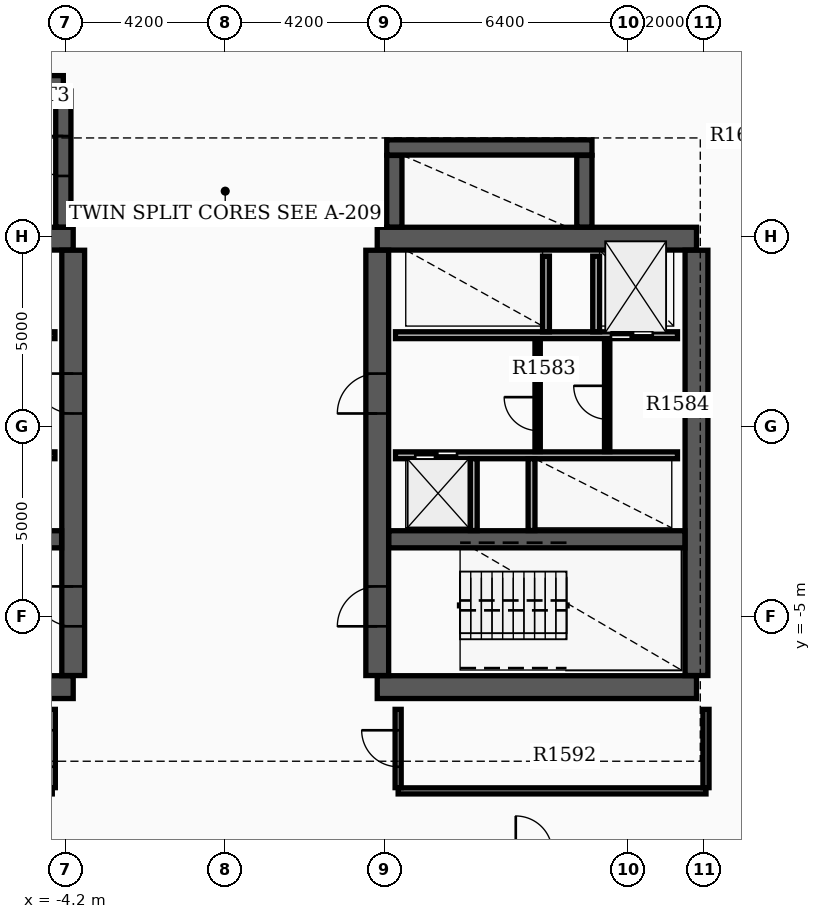
"""IFC4 building model, lengths in metres.
Left out: names, types, materials, properties, quantities, classifications, styles, units other than length and angle.
Written with IfcOpenShell. Run it as: python <this file> out.ifc"""

import sys

from ifc_helpers import new_model, si_unit, direction, frame, frame_2d, origin, place, context, subcontext, project, spatial, rectangle, extrude, element, fill, save


model = new_model("IFC4")
c1 = context("Model", 3, precision=1e-05, world=origin(), true_north=direction((0.0, 1.0)))
c2 = subcontext(c1, "Body", "Model", "MODEL_VIEW")
j1 = project(units=[si_unit("LENGTHUNIT", "METRE"), si_unit("PLANEANGLEUNIT", "RADIAN")], contexts=[c1])
p1 = place(None, origin())
s1 = spatial("IfcSite", under=j1, at=p1, CompositionType="ELEMENT")
p2 = place(p1, origin())
s2 = spatial("IfcBuilding", under=s1, at=p2, CompositionType="ELEMENT")
p3 = place(p2, frame((0.0, 0.0, 104.7)))
s3 = spatial("IfcBuildingStorey", under=s2, at=p3, CompositionType="ELEMENT", Elevation=104.7)
for number, where, z_axis, x_axis in (
    (1, (-12.4, -6.85, 0.0), (0.0, 0.0, 1.0), (1.0, 0.0, 0.0)),
    (2, (-12.4, 4.95, 0.0), (0.0, 0.0, 1.0), (1.0, 0.0, 0.0)),
):
    element("IfcWall", number, at=place(p3, frame(where, z_axis=z_axis, x_axis=x_axis)), inside=s3, PredefinedType="SHEAR", context=c2, shape_type="SweptSolid", body=[
        extrude(rectangle(XDim=8.4, YDim=0.6, at=frame_2d((4.2, 0.0))), origin(), (0.0, 0.0, 1.0), 3.7),
    ])
p4 = place(p3, frame((-4.0, -6.545, 0.0), z_axis=(0.0, 0.0, 1.0), x_axis=(0.0, 1.0, 0.0)))
e3 = element("IfcWall", 3, at=p4, inside=s3, PredefinedType="SHEAR", context=c2, shape_type="SweptSolid", body=[
    extrude(rectangle(XDim=11.19, YDim=0.6, at=frame_2d((5.595, 0.0))), origin(), (0.0, 0.0, 1.0), 3.7),
])
p5 = place(p4, frame((1.295, 0.0, 0.0)))
e4 = element("IfcOpeningElement", 4, at=p5, cuts=e3, PredefinedType="OPENING", context=c2, shape_type="SweptSolid", body=[
    extrude(rectangle(XDim=1.05, YDim=2.15, at=frame_2d((0.525, 1.075))), frame((0.0, 0.31, 0.0), z_axis=(0.0, -1.0, 0.0), x_axis=(1.0, 0.0, 0.0)), (0.0, 0.0, 1.0), 0.62),
])
p6 = place(p4, frame((6.895, 0.0, 0.0)))
e5 = element("IfcOpeningElement", 5, at=p6, cuts=e3, PredefinedType="OPENING", context=c2, shape_type="SweptSolid", body=[
    extrude(rectangle(XDim=1.05, YDim=2.15, at=frame_2d((0.525, 1.075))), frame((0.0, 0.31, 0.0), z_axis=(0.0, -1.0, 0.0), x_axis=(1.0, 0.0, 0.0)), (0.0, 0.0, 1.0), 0.62),
])
p7 = place(p3, frame((-12.095, -2.96, 0.0), z_axis=(0.0, 0.0, 1.0), x_axis=(1.0, 0.0, 0.0)))
e6 = element("IfcWall", 6, at=p7, inside=s3, PredefinedType="SHEAR", context=c2, shape_type="SweptSolid", body=[
    extrude(rectangle(XDim=7.79, YDim=0.45, at=frame_2d((3.895, 0.0))), origin(), (0.0, 0.0, 1.0), 3.7),
])
for number, where, z_axis, x_axis in (
    (7, (4.0, -6.85, 0.0), (0.0, 0.0, 1.0), (1.0, 0.0, 0.0)),
    (8, (4.0, 4.95, 0.0), (0.0, 0.0, 1.0), (1.0, 0.0, 0.0)),
):
    element("IfcWall", number, at=place(p3, frame(where, z_axis=z_axis, x_axis=x_axis)), inside=s3, PredefinedType="SHEAR", context=c2, shape_type="SweptSolid", body=[
        extrude(rectangle(XDim=8.4, YDim=0.6, at=frame_2d((4.2, 0.0))), origin(), (0.0, 0.0, 1.0), 3.7),
    ])
p8 = place(p3, frame((4.0, -6.545, 0.0), z_axis=(0.0, 0.0, 1.0), x_axis=(0.0, 1.0, 0.0)))
e9 = element("IfcWall", 9, at=p8, inside=s3, PredefinedType="SHEAR", context=c2, shape_type="SweptSolid", body=[
    extrude(rectangle(XDim=11.19, YDim=0.6, at=frame_2d((5.595, 0.0))), origin(), (0.0, 0.0, 1.0), 3.7),
])
p9 = place(p8, frame((1.295, 0.0, 0.0)))
e10 = element("IfcOpeningElement", 10, at=p9, cuts=e9, PredefinedType="OPENING", context=c2, shape_type="SweptSolid", body=[
    extrude(rectangle(XDim=1.05, YDim=2.15, at=frame_2d((0.525, 1.075))), frame((0.0, 0.31, 0.0), z_axis=(0.0, -1.0, 0.0), x_axis=(1.0, 0.0, 0.0)), (0.0, 0.0, 1.0), 0.62),
])
p10 = place(p8, frame((6.895, 0.0, 0.0)))
e11 = element("IfcOpeningElement", 11, at=p10, cuts=e9, PredefinedType="OPENING", context=c2, shape_type="SweptSolid", body=[
    extrude(rectangle(XDim=1.05, YDim=2.15, at=frame_2d((0.525, 1.075))), frame((0.0, 0.31, 0.0), z_axis=(0.0, -1.0, 0.0), x_axis=(1.0, 0.0, 0.0)), (0.0, 0.0, 1.0), 0.62),
])
p11 = place(p3, frame((12.4, -6.545, 0.0), z_axis=(0.0, 0.0, 1.0), x_axis=(0.0, 1.0, 0.0)))
e12 = element("IfcWall", 12, at=p11, inside=s3, PredefinedType="SHEAR", context=c2, shape_type="SweptSolid", body=[
    extrude(rectangle(XDim=11.19, YDim=0.6, at=frame_2d((5.595, 0.0))), origin(), (0.0, 0.0, 1.0), 3.7),
])
p12 = place(p3, frame((4.305, -2.96, 0.0), z_axis=(0.0, 0.0, 1.0), x_axis=(1.0, 0.0, 0.0)))
e13 = element("IfcWall", 13, at=p12, inside=s3, PredefinedType="SHEAR", context=c2, shape_type="SweptSolid", body=[
    extrude(rectangle(XDim=7.79, YDim=0.45, at=frame_2d((3.895, 0.0))), origin(), (0.0, 0.0, 1.0), 3.7),
])
p13 = place(p3, frame((-12.22, 9.04, 0.0), z_axis=(0.0, 0.0, 1.0), x_axis=(1.0, 0.0, 0.0)))
e14 = element("IfcWall", 14, at=p13, inside=s3, PredefinedType="SHEAR", context=c2, shape_type="SweptSolid", body=[
    extrude(rectangle(XDim=7.96, YDim=0.4, at=frame_2d((3.98, 0.0))), origin(), (0.0, 0.0, 1.0), 3.7),
])
p14 = place(p3, frame((-4.26, 5.255, 0.0), z_axis=(0.0, 0.0, 1.0), x_axis=(0.0, 1.0, 0.0)))
e15 = element("IfcWall", 15, at=p14, inside=s3, PredefinedType="SHEAR", context=c2, shape_type="SweptSolid", body=[
    extrude(rectangle(XDim=3.58, YDim=0.4, at=frame_2d((1.79, 0.0))), origin(), (0.0, 0.0, 1.0), 3.7),
])
p15 = place(p14, frame((1.345, 0.0, 0.0)))
e16 = element("IfcOpeningElement", 16, at=p15, cuts=e15, PredefinedType="OPENING", context=c2, shape_type="SweptSolid", body=[
    extrude(rectangle(XDim=1.05, YDim=2.15, at=frame_2d((0.525, 1.075))), frame((0.0, 0.21, 0.0), z_axis=(0.0, -1.0, 0.0), x_axis=(1.0, 0.0, 0.0)), (0.0, 0.0, 1.0), 0.42),
])
p16 = place(p3, frame((4.45, 5.255, 0.0), z_axis=(0.0, 0.0, 1.0), x_axis=(0.0, 1.0, 0.0)))
e17 = element("IfcWall", 17, at=p16, inside=s3, PredefinedType="SHEAR", context=c2, shape_type="SweptSolid", body=[
    extrude(rectangle(XDim=1.885, YDim=0.4, at=frame_2d((0.942, 0.0))), origin(), (0.0, 0.0, 1.0), 3.7),
])
p17 = place(p3, frame((4.25, 7.35, 0.0), z_axis=(0.0, 0.0, 1.0), x_axis=(1.0, 0.0, 0.0)))
e18 = element("IfcWall", 18, at=p17, inside=s3, PredefinedType="SHEAR", context=c2, shape_type="SweptSolid", body=[
    extrude(rectangle(XDim=5.4, YDim=0.4, at=frame_2d((2.7, 0.0))), origin(), (0.0, 0.0, 1.0), 3.7),
])
p18 = place(p3, frame((9.45, 5.255, 0.0), z_axis=(0.0, 0.0, 1.0), x_axis=(0.0, 1.0, 0.0)))
e19 = element("IfcWall", 19, at=p18, inside=s3, PredefinedType="SHEAR", context=c2, shape_type="SweptSolid", body=[
    extrude(rectangle(XDim=1.885, YDim=0.4, at=frame_2d((0.942, 0.0))), origin(), (0.0, 0.0, 1.0), 3.7),
])
p19 = place(p3, frame((-11.9, 2.41, 0.0), z_axis=(0.0, 0.0, 1.0), x_axis=(1.0, 0.0, 0.0)))
e20 = element("IfcWall", 20, at=p19, inside=s3, PredefinedType="SOLIDWALL", context=c2, shape_type="SweptSolid", body=[
    extrude(rectangle(XDim=7.42, YDim=0.18, at=frame_2d((3.71, 0.0))), origin(), (0.0, 0.0, 1.0), 2.96),
])
p20 = place(p19, frame((0.55, 0.0, 0.0)))
e21 = element("IfcOpeningElement", 21, at=p20, cuts=e20, PredefinedType="OPENING", context=c2, shape_type="SweptSolid", body=[
    extrude(rectangle(XDim=1.1, YDim=2.15, at=frame_2d((0.55, 1.075))), frame((0.0, 0.1, 0.0), z_axis=(0.0, -1.0, 0.0), x_axis=(1.0, 0.0, 0.0)), (0.0, 0.0, 1.0), 0.2),
])
p21 = place(p3, frame((4.48, 2.41, 0.0), z_axis=(0.0, 0.0, 1.0), x_axis=(1.0, 0.0, 0.0)))
e22 = element("IfcWall", 22, at=p21, inside=s3, PredefinedType="SOLIDWALL", context=c2, shape_type="SweptSolid", body=[
    extrude(rectangle(XDim=7.42, YDim=0.18, at=frame_2d((3.71, 0.0))), origin(), (0.0, 0.0, 1.0), 2.96),
])
p22 = place(p21, frame((5.67, 0.0, 0.0)))
e23 = element("IfcOpeningElement", 23, at=p22, cuts=e22, PredefinedType="OPENING", context=c2, shape_type="SweptSolid", body=[
    extrude(rectangle(XDim=1.1, YDim=2.15, at=frame_2d((0.55, 1.075))), frame((0.0, 0.1, 0.0), z_axis=(0.0, -1.0, 0.0), x_axis=(1.0, 0.0, 0.0)), (0.0, 0.0, 1.0), 0.2),
])
p23 = place(p3, frame((-11.9, -0.75, 0.0), z_axis=(0.0, 0.0, 1.0), x_axis=(1.0, 0.0, 0.0)))
e24 = element("IfcWall", 24, at=p23, inside=s3, PredefinedType="SOLIDWALL", context=c2, shape_type="SweptSolid", body=[
    extrude(rectangle(XDim=7.42, YDim=0.18, at=frame_2d((3.71, 0.0))), origin(), (0.0, 0.0, 1.0), 2.96),
])
p24 = place(p23, frame((0.45, 0.0, 0.0)))
e25 = element("IfcOpeningElement", 25, at=p24, cuts=e24, PredefinedType="OPENING", context=c2, shape_type="SweptSolid", body=[
    extrude(rectangle(XDim=1.1, YDim=2.15, at=frame_2d((0.55, 1.075))), frame((0.0, 0.1, 0.0), z_axis=(0.0, -1.0, 0.0), x_axis=(1.0, 0.0, 0.0)), (0.0, 0.0, 1.0), 0.2),
])
p25 = place(p23, frame((2.35, 0.0, 0.0)))
e26 = element("IfcOpeningElement", 26, at=p25, cuts=e24, PredefinedType="OPENING", context=c2, shape_type="SweptSolid", body=[
    extrude(rectangle(XDim=1.1, YDim=2.15, at=frame_2d((0.55, 1.075))), frame((0.0, 0.1, 0.0), z_axis=(0.0, -1.0, 0.0), x_axis=(1.0, 0.0, 0.0)), (0.0, 0.0, 1.0), 0.2),
])
p26 = place(p3, frame((4.48, -0.75, 0.0), z_axis=(0.0, 0.0, 1.0), x_axis=(1.0, 0.0, 0.0)))
e27 = element("IfcWall", 27, at=p26, inside=s3, PredefinedType="SOLIDWALL", context=c2, shape_type="SweptSolid", body=[
    extrude(rectangle(XDim=7.42, YDim=0.18, at=frame_2d((3.71, 0.0))), origin(), (0.0, 0.0, 1.0), 2.96),
])
p27 = place(p26, frame((0.52, 0.0, 0.0)))
e28 = element("IfcOpeningElement", 28, at=p27, cuts=e27, PredefinedType="OPENING", context=c2, shape_type="SweptSolid", body=[
    extrude(rectangle(XDim=1.1, YDim=2.15, at=frame_2d((0.55, 1.075))), frame((0.0, 0.1, 0.0), z_axis=(0.0, -1.0, 0.0), x_axis=(1.0, 0.0, 0.0)), (0.0, 0.0, 1.0), 0.2),
])
for number, where, z_axis, x_axis in (
    (29, (8.44, 2.5, 0.0), (0.0, 0.0, 1.0), (0.0, 1.0, 0.0)),
    (30, (9.76, 2.5, 0.0), (0.0, 0.0, 1.0), (0.0, 1.0, 0.0)),
):
    element("IfcWall", number, at=place(p3, frame(where, z_axis=z_axis, x_axis=x_axis)), inside=s3, PredefinedType="SOLIDWALL", context=c2, shape_type="SweptSolid", body=[
        extrude(rectangle(XDim=1.99, YDim=0.18, at=frame_2d((0.995, 0.0))), origin(), (0.0, 0.0, 1.0), 2.96),
    ])
for number, where, z_axis, x_axis in (
    (31, (6.54, -2.73, 0.0), (0.0, 0.0, 1.0), (0.0, 1.0, 0.0)),
    (32, (8.06, -2.73, 0.0), (0.0, 0.0, 1.0), (0.0, 1.0, 0.0)),
):
    element("IfcWall", number, at=place(p3, frame(where, z_axis=z_axis, x_axis=x_axis)), inside=s3, PredefinedType="SOLIDWALL", context=c2, shape_type="SweptSolid", body=[
        extrude(rectangle(XDim=1.89, YDim=0.18, at=frame_2d((0.945, 0.0))), origin(), (0.0, 0.0, 1.0), 2.96),
    ])
p28 = place(p3, frame((8.22, -0.65, 0.0), z_axis=(0.0, 0.0, 1.0), x_axis=(0.0, 1.0, 0.0)))
e33 = element("IfcWall", 33, at=p28, inside=s3, PredefinedType="SOLIDWALL", context=c2, shape_type="SweptSolid", body=[
    extrude(rectangle(XDim=2.96, YDim=0.14, at=frame_2d((1.48, 0.0))), origin(), (0.0, 0.0, 1.0), 2.96),
])
p29 = place(p28, frame((0.55, 0.0, 0.0)))
e34 = element("IfcOpeningElement", 34, at=p29, cuts=e33, PredefinedType="OPENING", context=c2, shape_type="SweptSolid", body=[
    extrude(rectangle(XDim=0.88, YDim=2.1, at=frame_2d((0.44, 1.05))), frame((0.0, 0.08, 0.0), z_axis=(0.0, -1.0, 0.0), x_axis=(1.0, 0.0, 0.0)), (0.0, 0.0, 1.0), 0.16),
])
p30 = place(p3, frame((10.05, -0.652, 0.0), z_axis=(0.0, 0.0, 1.0), x_axis=(0.0, 1.0, 0.0)))
e35 = element("IfcWall", 35, at=p30, inside=s3, PredefinedType="PARTITIONING", context=c2, shape_type="SweptSolid", body=[
    extrude(rectangle(XDim=2.962, YDim=0.14, at=frame_2d((1.481, 0.0))), origin(), (0.0, 0.0, 1.0), 2.96),
])
p31 = place(p30, frame((0.85, 0.0, 0.0)))
e36 = element("IfcOpeningElement", 36, at=p31, cuts=e35, PredefinedType="OPENING", context=c2, shape_type="SweptSolid", body=[
    extrude(rectangle(XDim=0.88, YDim=2.1, at=frame_2d((0.44, 1.05))), frame((0.0, 0.08, 0.0), z_axis=(0.0, -1.0, 0.0), x_axis=(1.0, 0.0, 0.0)), (0.0, 0.0, 1.0), 0.16),
])
p32 = place(p3, frame((4.55, -9.58, 0.0), z_axis=(0.0, 0.0, 1.0), x_axis=(1.0, 0.0, 0.0)))
e37 = element("IfcWall", 37, at=p32, inside=s3, PredefinedType="PARTITIONING", context=c2, shape_type="SweptSolid", body=[
    extrude(rectangle(XDim=8.1, YDim=0.16, at=frame_2d((4.05, 0.0))), origin(), (0.0, 0.0, 1.0), 2.96),
])
p33 = place(p3, frame((4.55, -9.495, 0.0), z_axis=(0.0, 0.0, 1.0), x_axis=(0.0, 1.0, 0.0)))
e38 = element("IfcWall", 38, at=p33, inside=s3, PredefinedType="PARTITIONING", context=c2, shape_type="SweptSolid", body=[
    extrude(rectangle(XDim=2.06, YDim=0.16, at=frame_2d((1.03, 0.0))), origin(), (0.0, 0.0, 1.0), 2.96),
])
p34 = place(p33, frame((0.55, 0.0, 0.0)))
e39 = element("IfcOpeningElement", 39, at=p34, cuts=e38, PredefinedType="OPENING", context=c2, shape_type="SweptSolid", body=[
    extrude(rectangle(XDim=0.96, YDim=2.15, at=frame_2d((0.48, 1.075))), frame((0.0, 0.09, 0.0), z_axis=(0.0, -1.0, 0.0), x_axis=(1.0, 0.0, 0.0)), (0.0, 0.0, 1.0), 0.18),
])
p35 = place(p3, frame((12.65, -9.495, 0.0), z_axis=(0.0, 0.0, 1.0), x_axis=(0.0, 1.0, 0.0)))
e40 = element("IfcWall", 40, at=p35, inside=s3, PredefinedType="PARTITIONING", context=c2, shape_type="SweptSolid", body=[
    extrude(rectangle(XDim=2.06, YDim=0.16, at=frame_2d((1.03, 0.0))), origin(), (0.0, 0.0, 1.0), 2.96),
])
p36 = place(p3, frame((-4.55, -9.495, 0.0), z_axis=(0.0, 0.0, 1.0), x_axis=(0.0, 1.0, 0.0)))
e41 = element("IfcWall", 41, at=p36, inside=s3, PredefinedType="PARTITIONING", context=c2, shape_type="SweptSolid", body=[
    extrude(rectangle(XDim=2.06, YDim=0.16, at=frame_2d((1.03, 0.0))), origin(), (0.0, 0.0, 1.0), 2.96),
])
p37 = place(p36, frame((0.55, 0.0, 0.0)))
e42 = element("IfcOpeningElement", 42, at=p37, cuts=e41, PredefinedType="OPENING", context=c2, shape_type="SweptSolid", body=[
    extrude(rectangle(XDim=0.96, YDim=2.15, at=frame_2d((0.48, 1.075))), frame((0.0, 0.09, 0.0), z_axis=(0.0, -1.0, 0.0), x_axis=(1.0, 0.0, 0.0)), (0.0, 0.0, 1.0), 0.18),
])
p38 = place(p5, origin())
e43 = element("IfcDoor", 43, at=p38, inside=s3, OperationType="SINGLE_SWING_RIGHT", PredefinedType="DOOR", context=c2, shape_type="SweptSolid", body=[
    extrude(rectangle(XDim=1.05, YDim=2.15, at=frame_2d((0.525, 1.075))), frame((0.0, 0.025, 0.0), z_axis=(0.0, -1.0, 0.0), x_axis=(1.0, 0.0, 0.0)), (0.0, 0.0, 1.0), 0.05),
])
fill(e4, e43)
p39 = place(p9, origin())
e44 = element("IfcDoor", 44, at=p39, inside=s3, OperationType="SINGLE_SWING_LEFT", PredefinedType="DOOR", context=c2, shape_type="SweptSolid", body=[
    extrude(rectangle(XDim=1.05, YDim=2.15, at=frame_2d((0.525, 1.075))), frame((0.0, 0.025, 0.0), z_axis=(0.0, -1.0, 0.0), x_axis=(1.0, 0.0, 0.0)), (0.0, 0.0, 1.0), 0.05),
])
fill(e10, e44)
p40 = place(p6, origin())
e45 = element("IfcDoor", 45, at=p40, inside=s3, OperationType="SINGLE_SWING_RIGHT", PredefinedType="DOOR", context=c2, shape_type="SweptSolid", body=[
    extrude(rectangle(XDim=1.05, YDim=2.15, at=frame_2d((0.525, 1.075))), frame((0.0, 0.025, 0.0), z_axis=(0.0, -1.0, 0.0), x_axis=(1.0, 0.0, 0.0)), (0.0, 0.0, 1.0), 0.05),
])
fill(e5, e45)
p41 = place(p10, origin())
e46 = element("IfcDoor", 46, at=p41, inside=s3, OperationType="SINGLE_SWING_LEFT", PredefinedType="DOOR", context=c2, shape_type="SweptSolid", body=[
    extrude(rectangle(XDim=1.05, YDim=2.15, at=frame_2d((0.525, 1.075))), frame((0.0, 0.025, 0.0), z_axis=(0.0, -1.0, 0.0), x_axis=(1.0, 0.0, 0.0)), (0.0, 0.0, 1.0), 0.05),
])
fill(e11, e46)
p42 = place(p15, origin())
e47 = element("IfcDoor", 47, at=p42, inside=s3, OperationType="SINGLE_SWING_RIGHT", PredefinedType="DOOR", context=c2, shape_type="SweptSolid", body=[
    extrude(rectangle(XDim=1.05, YDim=2.15, at=frame_2d((0.525, 1.075))), frame((0.0, 0.025, 0.0), z_axis=(0.0, -1.0, 0.0), x_axis=(1.0, 0.0, 0.0)), (0.0, 0.0, 1.0), 0.05),
])
fill(e16, e47)
p43 = place(p22, origin())
e48 = element("IfcDoor", 48, at=p43, inside=s3, OperationType="DOUBLE_DOOR_SLIDING", PredefinedType="DOOR", context=c2, shape_type="SweptSolid", body=[
    extrude(rectangle(XDim=1.1, YDim=2.15, at=frame_2d((0.55, 1.075))), frame((0.0, 0.025, 0.0), z_axis=(0.0, -1.0, 0.0), x_axis=(1.0, 0.0, 0.0)), (0.0, 0.0, 1.0), 0.05),
])
fill(e23, e48)
p44 = place(p27, origin())
e49 = element("IfcDoor", 49, at=p44, inside=s3, OperationType="DOUBLE_DOOR_SLIDING", PredefinedType="DOOR", context=c2, shape_type="SweptSolid", body=[
    extrude(rectangle(XDim=1.1, YDim=2.15, at=frame_2d((0.55, 1.075))), frame((0.0, 0.025, 0.0), z_axis=(0.0, -1.0, 0.0), x_axis=(1.0, 0.0, 0.0)), (0.0, 0.0, 1.0), 0.05),
])
fill(e28, e49)
p45 = place(p29, origin())
e50 = element("IfcDoor", 50, at=p45, inside=s3, OperationType="SINGLE_SWING_RIGHT", PredefinedType="DOOR", context=c2, shape_type="SweptSolid", body=[
    extrude(rectangle(XDim=0.88, YDim=2.1, at=frame_2d((0.44, 1.05))), frame((0.0, 0.025, 0.0), z_axis=(0.0, -1.0, 0.0), x_axis=(1.0, 0.0, 0.0)), (0.0, 0.0, 1.0), 0.05),
])
fill(e34, e50)
p46 = place(p31, origin())
e51 = element("IfcDoor", 51, at=p46, inside=s3, OperationType="SINGLE_SWING_RIGHT", PredefinedType="DOOR", context=c2, shape_type="SweptSolid", body=[
    extrude(rectangle(XDim=0.88, YDim=2.1, at=frame_2d((0.44, 1.05))), frame((0.0, 0.025, 0.0), z_axis=(0.0, -1.0, 0.0), x_axis=(1.0, 0.0, 0.0)), (0.0, 0.0, 1.0), 0.05),
])
fill(e36, e51)
p47 = place(p34, origin())
e52 = element("IfcDoor", 52, at=p47, inside=s3, OperationType="SINGLE_SWING_RIGHT", PredefinedType="DOOR", context=c2, shape_type="SweptSolid", body=[
    extrude(rectangle(XDim=0.96, YDim=2.15, at=frame_2d((0.48, 1.075))), frame((0.0, 0.025, 0.0), z_axis=(0.0, -1.0, 0.0), x_axis=(1.0, 0.0, 0.0)), (0.0, 0.0, 1.0), 0.05),
])
fill(e39, e52)
p48 = place(p37, origin())
e53 = element("IfcDoor", 53, at=p48, inside=s3, OperationType="SINGLE_SWING_LEFT", PredefinedType="DOOR", context=c2, shape_type="SweptSolid", body=[
    extrude(rectangle(XDim=0.96, YDim=2.15, at=frame_2d((0.48, 1.075))), frame((0.0, 0.025, 0.0), z_axis=(0.0, -1.0, 0.0), x_axis=(1.0, 0.0, 0.0)), (0.0, 0.0, 1.0), 0.05),
])
fill(e42, e53)
save(model, sys.argv[1])
